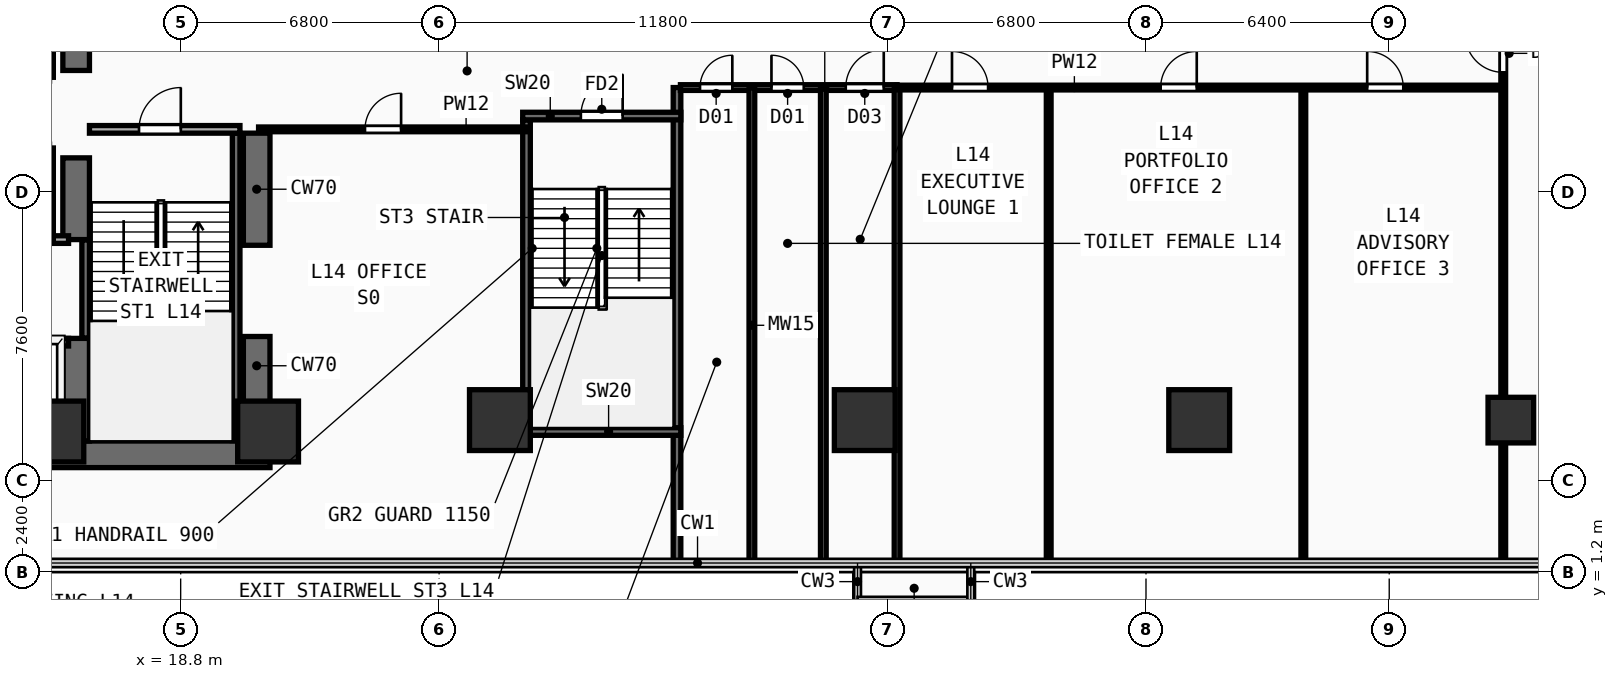
"""IFC4 building model, lengths in metres.
Left out: names, types, materials, properties, quantities, classifications, styles, units other than length and angle.
Written with IfcOpenShell. Run it as: python <this file> out.ifc"""

import sys

from ifc_helpers import new_model, si_unit, direction, frame, frame_2d, origin, origin_2d, place, context, subcontext, project, spatial, rectangle, extrude, element, fill, save


model = new_model("IFC4")
c1 = context("Model", 3, precision=1e-05, world=origin(), true_north=direction((0.0, 1.0)))
c2 = subcontext(c1, "Body", "Model", "MODEL_VIEW")
j1 = project(units=[si_unit("LENGTHUNIT", "METRE"), si_unit("PLANEANGLEUNIT", "RADIAN")], contexts=[c1])
p1 = place(None, origin())
s1 = spatial("IfcSite", under=j1, at=p1, CompositionType="ELEMENT")
p2 = place(p1, origin())
s2 = spatial("IfcBuilding", under=s1, at=p2, CompositionType="ELEMENT")
p3 = place(p2, frame((0.0, 0.0, 56.2)))
s3 = spatial("IfcBuildingStorey", under=s2, at=p3, CompositionType="ELEMENT", Elevation=56.2)
p4 = place(p3, frame((7.1, 4.3, 0.0), z_axis=(0.0, 0.0, 1.0), x_axis=(1.0, 0.0, 0.0)))
e1 = element("IfcWall", 1, at=p4, inside=s3, PredefinedType="SHEAR", context=c2, shape_type="SweptSolid", body=[
    extrude(rectangle(XDim=14.05, YDim=0.7, at=frame_2d((7.025, 0.0))), origin(), (0.0, 0.0, 1.0), 3.54),
])
p5 = place(p3, frame((20.8, 4.65, 0.0), z_axis=(0.0, 0.0, 1.0), x_axis=(0.0, 1.0, 0.0)))
e2 = element("IfcWall", 2, at=p5, inside=s3, PredefinedType="SHEAR", context=c2, shape_type="SweptSolid", body=[
    extrude(rectangle(XDim=2.75, YDim=0.7, at=frame_2d((1.375, 0.0))), origin(), (0.0, 0.0, 1.0), 3.54),
])
p6 = place(p3, frame((20.8, 9.8, 0.0), z_axis=(0.0, 0.0, 1.0), x_axis=(0.0, 1.0, 0.0)))
e3 = element("IfcWall", 3, at=p6, inside=s3, PredefinedType="SHEAR", context=c2, shape_type="SweptSolid", body=[
    extrude(rectangle(XDim=2.95, YDim=0.7, at=frame_2d((1.475, 0.0))), origin(), (0.0, 0.0, 1.0), 3.54),
])
p7 = place(p3, frame((16.05, 4.65, 0.0), z_axis=(0.0, 0.0, 1.0), x_axis=(0.0, 1.0, 0.0)))
e4 = element("IfcWall", 4, at=p7, inside=s3, PredefinedType="SHEAR", context=c2, shape_type="SweptSolid", body=[
    extrude(rectangle(XDim=2.7, YDim=0.7, at=frame_2d((1.35, 0.0))), origin(), (0.0, 0.0, 1.0), 3.54),
])
p8 = place(p3, frame((16.05, 9.95, 0.0), z_axis=(0.0, 0.0, 1.0), x_axis=(0.0, 1.0, 0.0)))
e5 = element("IfcWall", 5, at=p8, inside=s3, PredefinedType="SHEAR", context=c2, shape_type="SweptSolid", body=[
    extrude(rectangle(XDim=2.15, YDim=0.7, at=frame_2d((1.075, 0.0))), origin(), (0.0, 0.0, 1.0), 3.54),
])
p9 = place(p3, frame((16.05, 14.4, 0.0), z_axis=(0.0, 0.0, 1.0), x_axis=(0.0, 1.0, 0.0)))
e6 = element("IfcWall", 6, at=p9, inside=s3, PredefinedType="SHEAR", context=c2, shape_type="SweptSolid", body=[
    extrude(rectangle(XDim=9.1, YDim=0.7, at=frame_2d((4.55, 0.0))), origin(), (0.0, 0.0, 1.0), 3.54),
])
for number, where, z_axis, x_axis in (
    (7, (15.45, 4.9, 0.0), (0.0, 0.0, 1.0), (1.0, 0.0, 0.0)),
    (8, (21.1, 4.9, 0.0), (0.0, 0.0, 1.0), (1.0, 0.0, 0.0)),
    (9, (27.2, 5.2, 0.0), (0.0, 0.0, 1.0), (1.0, 0.0, 0.0)),
    (10, (36.8, 5.2, 0.0), (0.0, 0.0, 1.0), (1.0, 0.0, 0.0)),
    (11, (45.6, 5.2, 0.0), (0.0, 0.0, 1.0), (1.0, 0.0, 0.0)),
):
    element("IfcColumn", number, at=place(p3, frame(where, z_axis=z_axis, x_axis=x_axis)), inside=s3, PredefinedType="COLUMN", context=c2, shape_type="SweptSolid", body=[
        extrude(rectangle(XDim=1.6, YDim=1.6, at=origin_2d()), origin(), (0.0, 0.0, 1.0), 3.54),
    ])
p10 = place(p3, frame((53.8, 5.2, 0.0), z_axis=(0.0, 0.0, 1.0), x_axis=(1.0, 0.0, 0.0)))
e12 = element("IfcColumn", 12, at=p10, inside=s3, PredefinedType="COLUMN", context=c2, shape_type="SweptSolid", body=[
    extrude(rectangle(XDim=1.2, YDim=1.2, at=origin_2d()), origin(), (0.0, 0.0, 1.0), 3.54),
])
p11 = place(p3, frame((16.3, 7.36, 0.0), z_axis=(0.0, 0.0, 1.0), x_axis=(0.0, 1.0, 0.0)))
e13 = element("IfcWall", 13, at=p11, inside=s3, PredefinedType="SHEAR", context=c2, shape_type="SweptSolid", body=[
    extrude(rectangle(XDim=2.58, YDim=0.2, at=frame_2d((1.29, 0.0))), origin(), (0.0, 0.0, 1.0), 3.54),
])
p12 = place(p3, frame((20.26, 4.66, 0.0), z_axis=(0.0, 0.0, 1.0), x_axis=(0.0, 1.0, 0.0)))
e14 = element("IfcWall", 14, at=p12, inside=s3, PredefinedType="SHEAR", context=c2, shape_type="SweptSolid", body=[
    extrude(rectangle(XDim=8.09, YDim=0.2, at=frame_2d((4.045, 0.0))), origin(), (0.0, 0.0, 1.0), 3.54),
])
p13 = place(p3, frame((16.4, 12.85, 0.0), z_axis=(0.0, 0.0, 1.0), x_axis=(1.0, 0.0, 0.0)))
e15 = element("IfcWall", 15, at=p13, inside=s3, PredefinedType="PARTITIONING", context=c2, shape_type="SweptSolid", body=[
    extrude(rectangle(XDim=3.96, YDim=0.2, at=frame_2d((1.98, 0.0))), origin(), (0.0, 0.0, 1.0), 3.54),
])
p14 = place(p13, frame((1.304, 0.0, 0.0)))
e16 = element("IfcOpeningElement", 16, at=p14, cuts=e15, PredefinedType="OPENING", context=c2, shape_type="SweptSolid", body=[
    extrude(rectangle(XDim=1.1, YDim=2.2, at=frame_2d((0.55, 1.1))), frame((0.0, 0.11, 0.0), z_axis=(0.0, -1.0, 0.0), x_axis=(1.0, 0.0, 0.0)), (0.0, 0.0, 1.0), 0.22),
])
p15 = place(p3, frame((27.9, 5.0, 0.0), z_axis=(0.0, 0.0, 1.0), x_axis=(0.0, 1.0, 0.0)))
e17 = element("IfcWall", 17, at=p15, inside=s3, PredefinedType="SHEAR", context=c2, shape_type="SweptSolid", body=[
    extrude(rectangle(XDim=8.1, YDim=0.2, at=frame_2d((4.05, 0.0))), origin(), (0.0, 0.0, 1.0), 3.54),
])
p16 = place(p3, frame((31.86, 1.44, 0.0), z_axis=(0.0, 0.0, 1.0), x_axis=(0.0, 1.0, 0.0)))
e18 = element("IfcWall", 18, at=p16, inside=s3, PredefinedType="SHEAR", context=c2, shape_type="SweptSolid", body=[
    extrude(rectangle(XDim=12.51, YDim=0.2, at=frame_2d((6.255, 0.0))), origin(), (0.0, 0.0, 1.0), 3.54),
])
p17 = place(p3, frame((27.8, 4.9, 0.0), z_axis=(0.0, 0.0, 1.0), x_axis=(1.0, 0.0, 0.0)))
e19 = element("IfcWall", 19, at=p17, inside=s3, PredefinedType="SHEAR", context=c2, shape_type="SweptSolid", body=[
    extrude(rectangle(XDim=4.16, YDim=0.2, at=frame_2d((2.08, 0.0))), origin(), (0.0, 0.0, 1.0), 3.54),
])
p18 = place(p3, frame((27.8, 13.2, 0.0), z_axis=(0.0, 0.0, 1.0), x_axis=(1.0, 0.0, 0.0)))
e20 = element("IfcWall", 20, at=p18, inside=s3, PredefinedType="SHEAR", context=c2, shape_type="SweptSolid", body=[
    extrude(rectangle(XDim=4.16, YDim=0.2, at=frame_2d((2.08, 0.0))), origin(), (0.0, 0.0, 1.0), 3.54),
])
p19 = place(p18, frame((1.53, 0.0, 0.0)))
e21 = element("IfcOpeningElement", 21, at=p19, cuts=e20, PredefinedType="OPENING", context=c2, shape_type="SweptSolid", body=[
    extrude(rectangle(XDim=1.1, YDim=2.2, at=frame_2d((0.55, 1.1))), frame((0.0, 0.11, 0.0), z_axis=(0.0, -1.0, 0.0), x_axis=(1.0, 0.0, 0.0)), (0.0, 0.0, 1.0), 0.22),
])
p20 = place(p3, frame((7.5, 7.25, 0.0), z_axis=(0.0, 0.0, 1.0), x_axis=(1.0, 0.0, 0.0)))
e22 = element("IfcWall", 22, at=p20, inside=s3, PredefinedType="PARTITIONING", context=c2, shape_type="SweptSolid", body=[
    extrude(rectangle(XDim=8.35, YDim=0.2, at=frame_2d((4.175, 0.0))), origin(), (0.0, 0.0, 1.0), 3.54),
])
p21 = place(p20, frame((0.53, 0.0, 0.0)))
e23 = element("IfcOpeningElement", 23, at=p21, cuts=e22, PredefinedType="OPENING", context=c2, shape_type="SweptSolid", body=[
    extrude(rectangle(XDim=1.1, YDim=2.2, at=frame_2d((0.55, 1.1))), frame((0.0, 0.11, 0.0), z_axis=(0.0, -1.0, 0.0), x_axis=(1.0, 0.0, 0.0)), (0.0, 0.0, 1.0), 0.22),
])
p22 = place(p20, frame((2.37, 0.0, 0.0)))
e24 = element("IfcOpeningElement", 24, at=p22, cuts=e22, PredefinedType="OPENING", context=c2, shape_type="SweptSolid", body=[
    extrude(rectangle(XDim=1.1, YDim=2.2, at=frame_2d((0.55, 1.1))), frame((0.0, 0.11, 0.0), z_axis=(0.0, -1.0, 0.0), x_axis=(1.0, 0.0, 0.0)), (0.0, 0.0, 1.0), 0.22),
])
p23 = place(p20, frame((4.33, 0.0, 0.0)))
e25 = element("IfcOpeningElement", 25, at=p23, cuts=e22, PredefinedType="OPENING", context=c2, shape_type="SweptSolid", body=[
    extrude(rectangle(XDim=1.1, YDim=2.2, at=frame_2d((0.55, 1.1))), frame((0.0, 0.11, 0.0), z_axis=(0.0, -1.0, 0.0), x_axis=(1.0, 0.0, 0.0)), (0.0, 0.0, 1.0), 0.22),
])
p24 = place(p20, frame((6.5, 0.0, 0.0)))
e26 = element("IfcOpeningElement", 26, at=p24, cuts=e22, PredefinedType="OPENING", context=c2, shape_type="SweptSolid", body=[
    extrude(rectangle(XDim=1.1, YDim=2.2, at=frame_2d((0.55, 1.1))), frame((0.0, 0.11, 0.0), z_axis=(0.0, -1.0, 0.0), x_axis=(1.0, 0.0, 0.0)), (0.0, 0.0, 1.0), 0.22),
])
p25 = place(p3, frame((7.5, 9.95, 0.0), z_axis=(0.0, 0.0, 1.0), x_axis=(1.0, 0.0, 0.0)))
e27 = element("IfcWall", 27, at=p25, inside=s3, PredefinedType="PARTITIONING", context=c2, shape_type="SweptSolid", body=[
    extrude(rectangle(XDim=8.35, YDim=0.2, at=frame_2d((4.175, 0.0))), origin(), (0.0, 0.0, 1.0), 3.54),
])
p26 = place(p3, frame((15.35, 9.95, 0.0), z_axis=(0.0, 0.0, 1.0), x_axis=(0.0, 1.0, 0.0)))
e28 = element("IfcWall", 28, at=p26, inside=s3, PredefinedType="PARTITIONING", context=c2, shape_type="SweptSolid", body=[
    extrude(rectangle(XDim=2.41, YDim=0.2, at=frame_2d((1.205, 0.0))), origin(), (0.0, 0.0, 1.0), 3.54),
])
p27 = place(p3, frame((15.35, 14.22, 0.0), z_axis=(0.0, 0.0, 1.0), x_axis=(0.0, 1.0, 0.0)))
e29 = element("IfcWall", 29, at=p27, inside=s3, PredefinedType="PARTITIONING", context=c2, shape_type="SweptSolid", body=[
    extrude(rectangle(XDim=2.23, YDim=0.2, at=frame_2d((1.115, 0.0))), origin(), (0.0, 0.0, 1.0), 3.54),
])
p28 = place(p3, frame((31.95, 13.95, 0.0), z_axis=(0.0, 0.0, 1.0), x_axis=(1.0, 0.0, 0.0)))
e30 = element("IfcWall", 30, at=p28, inside=s3, PredefinedType="PLUMBINGWALL", context=c2, shape_type="SweptSolid", body=[
    extrude(rectangle(XDim=5.7, YDim=0.15, at=frame_2d((2.85, 0.0))), origin(), (0.0, 0.0, 1.0), 3.54),
])
p29 = place(p28, frame((0.515, 0.0, 0.0)))
e31 = element("IfcOpeningElement", 31, at=p29, cuts=e30, PredefinedType="OPENING", context=c2, shape_type="SweptSolid", body=[
    extrude(rectangle(XDim=0.85, YDim=2.15, at=frame_2d((0.425, 1.075))), frame((0.0, 0.085, 0.0), z_axis=(0.0, -1.0, 0.0), x_axis=(1.0, 0.0, 0.0)), (0.0, 0.0, 1.0), 0.17),
])
p30 = place(p28, frame((2.395, 0.0, 0.0)))
e32 = element("IfcOpeningElement", 32, at=p30, cuts=e30, PredefinedType="OPENING", context=c2, shape_type="SweptSolid", body=[
    extrude(rectangle(XDim=0.85, YDim=2.15, at=frame_2d((0.425, 1.075))), frame((0.0, 0.085, 0.0), z_axis=(0.0, -1.0, 0.0), x_axis=(1.0, 0.0, 0.0)), (0.0, 0.0, 1.0), 0.17),
])
p31 = place(p28, frame((4.35, 0.0, 0.0)))
e33 = element("IfcOpeningElement", 33, at=p31, cuts=e30, PredefinedType="OPENING", context=c2, shape_type="SweptSolid", body=[
    extrude(rectangle(XDim=1.0, YDim=2.2, at=frame_2d((0.5, 1.1))), frame((0.0, 0.085, 0.0), z_axis=(0.0, -1.0, 0.0), x_axis=(1.0, 0.0, 0.0)), (0.0, 0.0, 1.0), 0.17),
])
for number, where, z_axis, x_axis in (
    (34, (33.83, 1.44, 0.0), (0.0, 0.0, 1.0), (0.0, 1.0, 0.0)),
    (35, (35.71, 1.44, 0.0), (0.0, 0.0, 1.0), (0.0, 1.0, 0.0)),
    (36, (37.65, 1.44, 0.0), (0.0, 0.0, 1.0), (0.0, 1.0, 0.0)),
):
    element("IfcWall", number, at=place(p3, frame(where, z_axis=z_axis, x_axis=x_axis)), inside=s3, PredefinedType="PLUMBINGWALL", context=c2, shape_type="SweptSolid", body=[
        extrude(rectangle(XDim=12.51, YDim=0.15, at=frame_2d((6.255, 0.0))), origin(), (0.0, 0.0, 1.0), 3.54),
    ])
p32 = place(p3, frame((20.85, 12.85, 0.0), z_axis=(0.0, 0.0, 1.0), x_axis=(1.0, 0.0, 0.0)))
e37 = element("IfcWall", 37, at=p32, inside=s3, PredefinedType="PARTITIONING", context=c2, shape_type="SweptSolid", body=[
    extrude(rectangle(XDim=7.05, YDim=0.125, at=frame_2d((3.525, 0.0))), origin(), (0.0, 0.0, 1.0), 3.54),
])
p33 = place(p32, frame((2.8, 0.0, 0.0)))
e38 = element("IfcOpeningElement", 38, at=p33, cuts=e37, PredefinedType="OPENING", context=c2, shape_type="SweptSolid", body=[
    extrude(rectangle(XDim=0.95, YDim=2.15, at=frame_2d((0.475, 1.075))), frame((0.0, 0.073, 0.0), z_axis=(0.0, -1.0, 0.0), x_axis=(1.0, 0.0, 0.0)), (0.0, 0.0, 1.0), 0.145),
])
p34 = place(p3, frame((37.65, 13.95, 0.0), z_axis=(0.0, 0.0, 1.0), x_axis=(1.0, 0.0, 0.0)))
e39 = element("IfcWall", 39, at=p34, inside=s3, PredefinedType="PARTITIONING", context=c2, shape_type="SweptSolid", body=[
    extrude(rectangle(XDim=15.95, YDim=0.125, at=frame_2d((7.975, 0.0))), origin(), (0.0, 0.0, 1.0), 3.54),
])
p35 = place(p34, frame((1.445, 0.0, 0.0)))
e40 = element("IfcOpeningElement", 40, at=p35, cuts=e39, PredefinedType="OPENING", context=c2, shape_type="SweptSolid", body=[
    extrude(rectangle(XDim=0.95, YDim=2.15, at=frame_2d((0.475, 1.075))), frame((0.0, 0.073, 0.0), z_axis=(0.0, -1.0, 0.0), x_axis=(1.0, 0.0, 0.0)), (0.0, 0.0, 1.0), 0.145),
])
p36 = place(p34, frame((6.936, 0.0, 0.0)))
e41 = element("IfcOpeningElement", 41, at=p36, cuts=e39, PredefinedType="OPENING", context=c2, shape_type="SweptSolid", body=[
    extrude(rectangle(XDim=0.95, YDim=2.15, at=frame_2d((0.475, 1.075))), frame((0.0, 0.073, 0.0), z_axis=(0.0, -1.0, 0.0), x_axis=(1.0, 0.0, 0.0)), (0.0, 0.0, 1.0), 0.145),
])
p37 = place(p34, frame((12.37, 0.0, 0.0)))
e42 = element("IfcOpeningElement", 42, at=p37, cuts=e39, PredefinedType="OPENING", context=c2, shape_type="SweptSolid", body=[
    extrude(rectangle(XDim=0.95, YDim=2.15, at=frame_2d((0.475, 1.075))), frame((0.0, 0.073, 0.0), z_axis=(0.0, -1.0, 0.0), x_axis=(1.0, 0.0, 0.0)), (0.0, 0.0, 1.0), 0.145),
])
for number, where, z_axis, x_axis in (
    (43, (41.64, 1.44, 0.0), (0.0, 0.0, 1.0), (0.0, 1.0, 0.0)),
    (44, (48.34, 1.44, 0.0), (0.0, 0.0, 1.0), (0.0, 1.0, 0.0)),
):
    element("IfcWall", number, at=place(p3, frame(where, z_axis=z_axis, x_axis=x_axis)), inside=s3, PredefinedType="PARTITIONING", context=c2, shape_type="SweptSolid", body=[
        extrude(rectangle(XDim=12.51, YDim=0.125, at=frame_2d((6.255, 0.0))), origin(), (0.0, 0.0, 1.0), 3.54),
    ])
p38 = place(p3, frame((53.6, 1.44, 0.0), z_axis=(0.0, 0.0, 1.0), x_axis=(0.0, 1.0, 0.0)))
e45 = element("IfcWall", 45, at=p38, inside=s3, PredefinedType="PARTITIONING", context=c2, shape_type="SweptSolid", body=[
    extrude(rectangle(XDim=22.12, YDim=0.125, at=frame_2d((11.06, 0.0))), origin(), (0.0, 0.0, 1.0), 2.94),
])
p39 = place(p38, frame((12.91, 0.0, 0.0)))
e46 = element("IfcOpeningElement", 46, at=p39, cuts=e45, PredefinedType="OPENING", context=c2, shape_type="SweptSolid", body=[
    extrude(rectangle(XDim=1.0, YDim=2.2, at=frame_2d((0.5, 1.1))), frame((0.0, 0.073, 0.0), z_axis=(0.0, -1.0, 0.0), x_axis=(1.0, 0.0, 0.0)), (0.0, 0.0, 1.0), 0.145),
])
p40 = place(p14, frame((1.1, 0.0, 0.0), z_axis=(0.0, 0.0, 1.0), x_axis=(-1.0, 0.0, 0.0)))
e47 = element("IfcDoor", 47, at=p40, inside=s3, OperationType="SINGLE_SWING_LEFT", PredefinedType="DOOR", context=c2, shape_type="SweptSolid", body=[
    extrude(rectangle(XDim=1.1, YDim=2.2, at=frame_2d((0.55, 1.1))), frame((0.0, 0.025, 0.0), z_axis=(0.0, -1.0, 0.0), x_axis=(1.0, 0.0, 0.0)), (0.0, 0.0, 1.0), 0.05),
])
fill(e16, e47)
p41 = place(p19, frame((1.1, 0.0, 0.0), z_axis=(0.0, 0.0, 1.0), x_axis=(-1.0, 0.0, 0.0)))
e48 = element("IfcDoor", 48, at=p41, inside=s3, OperationType="SINGLE_SWING_LEFT", PredefinedType="DOOR", context=c2, shape_type="SweptSolid", body=[
    extrude(rectangle(XDim=1.1, YDim=2.2, at=frame_2d((0.55, 1.1))), frame((0.0, 0.025, 0.0), z_axis=(0.0, -1.0, 0.0), x_axis=(1.0, 0.0, 0.0)), (0.0, 0.0, 1.0), 0.05),
])
fill(e21, e48)
p42 = place(p29, origin())
e49 = element("IfcDoor", 49, at=p42, inside=s3, OperationType="SINGLE_SWING_RIGHT", PredefinedType="DOOR", context=c2, shape_type="SweptSolid", body=[
    extrude(rectangle(XDim=0.85, YDim=2.15, at=frame_2d((0.425, 1.075))), frame((0.0, 0.025, 0.0), z_axis=(0.0, -1.0, 0.0), x_axis=(1.0, 0.0, 0.0)), (0.0, 0.0, 1.0), 0.05),
])
fill(e31, e49)
p43 = place(p30, origin())
e50 = element("IfcDoor", 50, at=p43, inside=s3, OperationType="SINGLE_SWING_LEFT", PredefinedType="DOOR", context=c2, shape_type="SweptSolid", body=[
    extrude(rectangle(XDim=0.85, YDim=2.15, at=frame_2d((0.425, 1.075))), frame((0.0, 0.025, 0.0), z_axis=(0.0, -1.0, 0.0), x_axis=(1.0, 0.0, 0.0)), (0.0, 0.0, 1.0), 0.05),
])
fill(e32, e50)
p44 = place(p31, origin())
e51 = element("IfcDoor", 51, at=p44, inside=s3, OperationType="SINGLE_SWING_RIGHT", PredefinedType="DOOR", context=c2, shape_type="SweptSolid", body=[
    extrude(rectangle(XDim=1.0, YDim=2.2, at=frame_2d((0.5, 1.1))), frame((0.0, 0.025, 0.0), z_axis=(0.0, -1.0, 0.0), x_axis=(1.0, 0.0, 0.0)), (0.0, 0.0, 1.0), 0.05),
])
fill(e33, e51)
p45 = place(p33, origin())
e52 = element("IfcDoor", 52, at=p45, inside=s3, OperationType="SINGLE_SWING_RIGHT", PredefinedType="DOOR", context=c2, shape_type="SweptSolid", body=[
    extrude(rectangle(XDim=0.95, YDim=2.15, at=frame_2d((0.475, 1.075))), frame((0.0, 0.025, 0.0), z_axis=(0.0, -1.0, 0.0), x_axis=(1.0, 0.0, 0.0)), (0.0, 0.0, 1.0), 0.05),
])
fill(e38, e52)
p46 = place(p35, origin())
e53 = element("IfcDoor", 53, at=p46, inside=s3, OperationType="SINGLE_SWING_LEFT", PredefinedType="DOOR", context=c2, shape_type="SweptSolid", body=[
    extrude(rectangle(XDim=0.95, YDim=2.15, at=frame_2d((0.475, 1.075))), frame((0.0, 0.025, 0.0), z_axis=(0.0, -1.0, 0.0), x_axis=(1.0, 0.0, 0.0)), (0.0, 0.0, 1.0), 0.05),
])
fill(e40, e53)
p47 = place(p36, origin())
e54 = element("IfcDoor", 54, at=p47, inside=s3, OperationType="SINGLE_SWING_RIGHT", PredefinedType="DOOR", context=c2, shape_type="SweptSolid", body=[
    extrude(rectangle(XDim=0.95, YDim=2.15, at=frame_2d((0.475, 1.075))), frame((0.0, 0.025, 0.0), z_axis=(0.0, -1.0, 0.0), x_axis=(1.0, 0.0, 0.0)), (0.0, 0.0, 1.0), 0.05),
])
fill(e41, e54)
p48 = place(p37, origin())
e55 = element("IfcDoor", 55, at=p48, inside=s3, OperationType="SINGLE_SWING_LEFT", PredefinedType="DOOR", context=c2, shape_type="SweptSolid", body=[
    extrude(rectangle(XDim=0.95, YDim=2.15, at=frame_2d((0.475, 1.075))), frame((0.0, 0.025, 0.0), z_axis=(0.0, -1.0, 0.0), x_axis=(1.0, 0.0, 0.0)), (0.0, 0.0, 1.0), 0.05),
])
fill(e42, e55)
p49 = place(p39, origin())
e56 = element("IfcDoor", 56, at=p49, inside=s3, OperationType="SINGLE_SWING_RIGHT", PredefinedType="DOOR", context=c2, shape_type="SweptSolid", body=[
    extrude(rectangle(XDim=1.0, YDim=2.2, at=frame_2d((0.5, 1.1))), frame((0.0, 0.025, 0.0), z_axis=(0.0, -1.0, 0.0), x_axis=(1.0, 0.0, 0.0)), (0.0, 0.0, 1.0), 0.05),
])
fill(e46, e56)
save(model, sys.argv[1])
